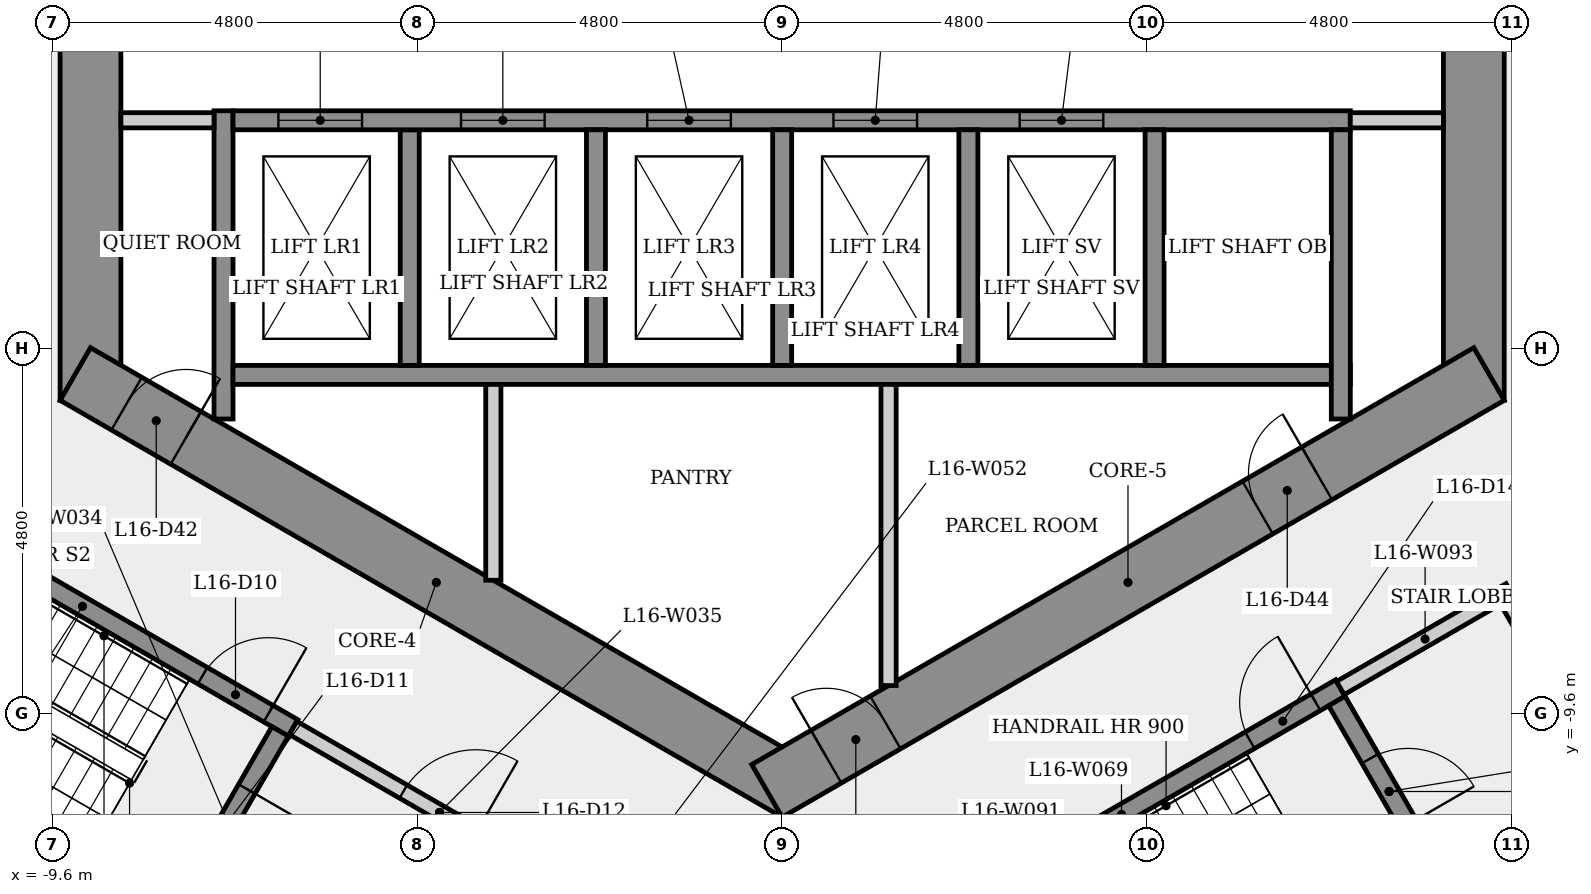
"""IFC4 building model, lengths in metres.
Left out: names, types, materials, properties, quantities, classifications, styles, units other than length and angle.
Written with IfcOpenShell. Run it as: python <this file> out.ifc"""

import sys

from ifc_helpers import new_model, si_unit, direction, frame, frame_2d, origin, place, context, subcontext, project, spatial, rectangle, extrude, element, fill, save


model = new_model("IFC4")
c1 = context("Model", 3, precision=1e-05, world=origin(), true_north=direction((0.0, 1.0)))
c2 = subcontext(c1, "Body", "Model", "MODEL_VIEW")
j1 = project(units=[si_unit("LENGTHUNIT", "METRE"), si_unit("PLANEANGLEUNIT", "RADIAN")], contexts=[c1])
p1 = place(None, origin())
s1 = spatial("IfcSite", under=j1, at=p1, CompositionType="ELEMENT")
p2 = place(p1, origin())
s2 = spatial("IfcBuilding", under=s1, at=p2, CompositionType="ELEMENT")
p3 = place(p2, frame((0.0, 0.0, 62.9)))
s3 = spatial("IfcBuildingStorey", under=s2, at=p3, CompositionType="ELEMENT", Elevation=62.9)
p4 = place(p3, frame((9.1, -5.485, 0.0), z_axis=(0.0, 0.0, 1.0), x_axis=(0.0, 1.0, 0.0)))
e1 = element("IfcWall", 1, at=p4, inside=s3, PredefinedType="SHEAR", context=c2, shape_type="SweptSolid", body=[
    extrude(rectangle(XDim=10.97, YDim=0.8, at=frame_2d((5.485, 0.0))), origin(), (0.0, 0.0, 1.0), 3.4),
])
p5 = place(p4, frame((4.685, 0.0, 0.0)))
e2 = element("IfcOpeningElement", 2, at=p5, cuts=e1, PredefinedType="OPENING", context=c2, shape_type="SweptSolid", body=[
    extrude(rectangle(XDim=1.6, YDim=2.1, at=frame_2d((0.8, 1.05))), frame((0.0, 0.41, 0.0), z_axis=(0.0, -1.0, 0.0), x_axis=(1.0, 0.0, 0.0)), (0.0, 0.0, 1.0), 0.82),
])
p6 = place(p3, frame((-9.1, 5.485, 0.0), z_axis=(0.0, 0.0, 1.0), x_axis=(0.0, -1.0, 0.0)))
e3 = element("IfcWall", 3, at=p6, inside=s3, PredefinedType="SHEAR", context=c2, shape_type="SweptSolid", body=[
    extrude(rectangle(XDim=10.97, YDim=0.8, at=frame_2d((5.485, 0.0))), origin(), (0.0, 0.0, 1.0), 3.4),
])
p7 = place(p6, frame((4.685, 0.0, 0.0)))
e4 = element("IfcOpeningElement", 4, at=p7, cuts=e3, PredefinedType="OPENING", context=c2, shape_type="SweptSolid", body=[
    extrude(rectangle(XDim=1.6, YDim=2.1, at=frame_2d((0.8, 1.05))), frame((0.0, 0.41, 0.0), z_axis=(0.0, -1.0, 0.0), x_axis=(1.0, 0.0, 0.0)), (0.0, 0.0, 1.0), 0.82),
])
p8 = place(p3, frame((-9.3, -5.138, 0.0), z_axis=(0.0, 0.0, 1.0), x_axis=(0.866023993627, -0.500002442456, 0.0)))
e5 = element("IfcWall", 5, at=p8, inside=s3, PredefinedType="SHEAR", context=c2, shape_type="SweptSolid", body=[
    extrude(rectangle(XDim=10.97, YDim=0.8, at=frame_2d((5.485, 0.0))), origin(), (0.0, 0.0, 1.0), 3.4),
])
p9 = place(p8, frame((0.78, 0.0, 0.0)))
e6 = element("IfcOpeningElement", 6, at=p9, cuts=e5, PredefinedType="OPENING", context=c2, shape_type="SweptSolid", body=[
    extrude(rectangle(XDim=0.9, YDim=2.1, at=frame_2d((0.45, 1.05))), frame((0.0, 0.41, 0.0), z_axis=(0.0, -1.0, 0.0), x_axis=(1.0, 0.0, 0.0)), (0.0, 0.0, 1.0), 0.82),
])
p10 = place(p3, frame((-0.2, -10.623, 0.0), z_axis=(0.0, 0.0, 1.0), x_axis=(0.866023993627, 0.500002442456, 0.0)))
e7 = element("IfcWall", 7, at=p10, inside=s3, PredefinedType="SHEAR", context=c2, shape_type="SweptSolid", body=[
    extrude(rectangle(XDim=10.97, YDim=0.8, at=frame_2d((5.485, 0.0))), origin(), (0.0, 0.0, 1.0), 3.4),
])
p11 = place(p10, frame((0.9, 0.0, 0.0)))
e8 = element("IfcOpeningElement", 8, at=p11, cuts=e7, PredefinedType="OPENING", context=c2, shape_type="SweptSolid", body=[
    extrude(rectangle(XDim=0.9, YDim=2.1, at=frame_2d((0.45, 1.05))), frame((0.0, 0.41, 0.0), z_axis=(0.0, -1.0, 0.0), x_axis=(1.0, 0.0, 0.0)), (0.0, 0.0, 1.0), 0.82),
])
p12 = place(p10, frame((7.455, 0.0, 0.0)))
e9 = element("IfcOpeningElement", 9, at=p12, cuts=e7, PredefinedType="OPENING", context=c2, shape_type="SweptSolid", body=[
    extrude(rectangle(XDim=0.9, YDim=2.1, at=frame_2d((0.45, 1.05))), frame((0.0, 0.41, 0.0), z_axis=(0.0, -1.0, 0.0), x_axis=(1.0, 0.0, 0.0)), (0.0, 0.0, 1.0), 0.82),
])
p13 = place(p3, frame((-11.977, -6.595, 0.0), z_axis=(0.0, 0.0, 1.0), x_axis=(0.866025499775, -0.499999833739, 0.0)))
e10 = element("IfcWall", 10, at=p13, inside=s3, PredefinedType="SHEAR", context=c2, shape_type="SweptSolid", body=[
    extrude(rectangle(XDim=6.4, YDim=0.25, at=frame_2d((3.2, 0.0))), origin(), (0.0, 0.0, 1.0), 3.0),
])
p14 = place(p13, frame((5.025, 0.0, 0.0)))
e11 = element("IfcOpeningElement", 11, at=p14, cuts=e10, PredefinedType="OPENING", context=c2, shape_type="SweptSolid", body=[
    extrude(rectangle(XDim=1.0, YDim=2.1, at=frame_2d((0.5, 1.05))), frame((0.0, 0.135, 0.0), z_axis=(0.0, -1.0, 0.0), x_axis=(1.0, 0.0, 0.0)), (0.0, 0.0, 1.0), 0.27),
])
p15 = place(p3, frame((-7.935, -12.393, 0.0), z_axis=(0.0, 0.0, 1.0), x_axis=(-0.866025499775, 0.499999833739, 0.0)))
e12 = element("IfcWall", 12, at=p15, inside=s3, PredefinedType="SHEAR", context=c2, shape_type="SweptSolid", body=[
    extrude(rectangle(XDim=6.4, YDim=0.25, at=frame_2d((3.2, 0.0))), origin(), (0.0, 0.0, 1.0), 3.0),
])
p16 = place(p3, frame((-7.35, -5.73, 0.0), z_axis=(0.0, 0.0, 1.0), x_axis=(0.0, 1.0, 0.0)))
e13 = element("IfcWall", 13, at=p16, inside=s3, PredefinedType="SHEAR", context=c2, shape_type="SweptSolid", body=[
    extrude(rectangle(XDim=4.055, YDim=0.25, at=frame_2d((2.028, 0.0))), origin(), (0.0, 0.0, 1.0), 3.0),
])
p17 = place(p3, frame((-7.475, -1.8, 0.0), z_axis=(0.0, 0.0, 1.0), x_axis=(-1.0, 0.0, 0.0)))
e14 = element("IfcWall", 14, at=p17, inside=s3, PredefinedType="PARTITIONING", context=c2, shape_type="SweptSolid", body=[
    extrude(rectangle(XDim=1.225, YDim=0.2, at=frame_2d((0.613, 0.0))), origin(), (0.0, 0.0, 1.0), 3.0),
])
p18 = place(p3, frame((-6.605, -9.841, 0.0), z_axis=(0.0, 0.0, 1.0), x_axis=(-0.499996545922, -0.866027397988, 0.0)))
e15 = element("IfcWall", 15, at=p18, inside=s3, PredefinedType="SHEAR", context=c2, shape_type="SweptSolid", body=[
    extrude(rectangle(XDim=2.75, YDim=0.25, at=frame_2d((1.375, 0.0))), origin(), (0.0, 0.0, 1.0), 3.0),
])
p19 = place(p18, frame((0.875, 0.0, 0.0)))
e16 = element("IfcOpeningElement", 16, at=p19, cuts=e15, PredefinedType="OPENING", context=c2, shape_type="SweptSolid", body=[
    extrude(rectangle(XDim=1.0, YDim=2.1, at=frame_2d((0.5, 1.05))), frame((0.0, 0.135, 0.0), z_axis=(0.0, -1.0, 0.0), x_axis=(1.0, 0.0, 0.0)), (0.0, 0.0, 1.0), 0.27),
])
p20 = place(p3, frame((-6.435, -9.795, 0.0), z_axis=(0.0, 0.0, 1.0), x_axis=(0.866012907634, -0.500021643343, 0.0)))
e17 = element("IfcWall", 17, at=p20, inside=s3, PredefinedType="PARTITIONING", context=c2, shape_type="SweptSolid", body=[
    extrude(rectangle(XDim=4.45, YDim=0.2, at=frame_2d((2.225, 0.0))), origin(), (0.0, 0.0, 1.0), 3.0),
])
p21 = place(p20, frame((1.675, 0.0, 0.0)))
e18 = element("IfcOpeningElement", 18, at=p21, cuts=e17, PredefinedType="OPENING", context=c2, shape_type="SweptSolid", body=[
    extrude(rectangle(XDim=1.1, YDim=2.1, at=frame_2d((0.55, 1.05))), frame((0.0, 0.11, 0.0), z_axis=(0.0, -1.0, 0.0), x_axis=(1.0, 0.0, 0.0)), (0.0, 0.0, 1.0), 0.22),
])
p22 = place(p3, frame((-7.225, -5.15, 0.0), z_axis=(0.0, 0.0, 1.0), x_axis=(1.0, 0.0, 0.0)))
e19 = element("IfcWall", 19, at=p22, inside=s3, PredefinedType="SHEAR", context=c2, shape_type="SweptSolid", body=[
    extrude(rectangle(XDim=14.7, YDim=0.25, at=frame_2d((7.35, 0.0))), origin(), (0.0, 0.0, 1.0), 3.0),
])
p23 = place(p3, frame((-4.9, -1.925, 0.0), z_axis=(0.0, 0.0, 1.0), x_axis=(0.0, -1.0, 0.0)))
e20 = element("IfcWall", 20, at=p23, inside=s3, PredefinedType="SHEAR", context=c2, shape_type="SweptSolid", body=[
    extrude(rectangle(XDim=3.1, YDim=0.25, at=frame_2d((1.55, 0.0))), origin(), (0.0, 0.0, 1.0), 3.4),
])
p24 = place(p3, frame((-7.225, -1.8, 0.0), z_axis=(0.0, 0.0, 1.0), x_axis=(1.0, 0.0, 0.0)))
e21 = element("IfcWall", 21, at=p24, inside=s3, PredefinedType="SHEAR", context=c2, shape_type="SweptSolid", body=[
    extrude(rectangle(XDim=14.7, YDim=0.25, at=frame_2d((7.35, 0.0))), origin(), (0.0, 0.0, 1.0), 3.0),
])
p25 = place(p24, frame((0.597, 0.0, 0.0)))
e22 = element("IfcOpeningElement", 22, at=p25, cuts=e21, PredefinedType="OPENING", context=c2, shape_type="SweptSolid", body=[
    extrude(rectangle(XDim=1.1, YDim=2.1, at=frame_2d((0.55, 1.05))), frame((0.0, 0.135, 0.0), z_axis=(0.0, -1.0, 0.0), x_axis=(1.0, 0.0, 0.0)), (0.0, 0.0, 1.0), 0.27),
])
p26 = place(p24, frame((3.0, 0.0, 0.0)))
e23 = element("IfcOpeningElement", 23, at=p26, cuts=e21, PredefinedType="OPENING", context=c2, shape_type="SweptSolid", body=[
    extrude(rectangle(XDim=1.1, YDim=2.1, at=frame_2d((0.55, 1.05))), frame((0.0, 0.135, 0.0), z_axis=(0.0, -1.0, 0.0), x_axis=(1.0, 0.0, 0.0)), (0.0, 0.0, 1.0), 0.27),
])
p27 = place(p24, frame((5.45, 0.0, 0.0)))
e24 = element("IfcOpeningElement", 24, at=p27, cuts=e21, PredefinedType="OPENING", context=c2, shape_type="SweptSolid", body=[
    extrude(rectangle(XDim=1.1, YDim=2.1, at=frame_2d((0.55, 1.05))), frame((0.0, 0.135, 0.0), z_axis=(0.0, -1.0, 0.0), x_axis=(1.0, 0.0, 0.0)), (0.0, 0.0, 1.0), 0.27),
])
p28 = place(p24, frame((7.9, 0.0, 0.0)))
e25 = element("IfcOpeningElement", 25, at=p28, cuts=e21, PredefinedType="OPENING", context=c2, shape_type="SweptSolid", body=[
    extrude(rectangle(XDim=1.1, YDim=2.1, at=frame_2d((0.55, 1.05))), frame((0.0, 0.135, 0.0), z_axis=(0.0, -1.0, 0.0), x_axis=(1.0, 0.0, 0.0)), (0.0, 0.0, 1.0), 0.27),
])
p29 = place(p24, frame((10.35, 0.0, 0.0)))
e26 = element("IfcOpeningElement", 26, at=p29, cuts=e21, PredefinedType="OPENING", context=c2, shape_type="SweptSolid", body=[
    extrude(rectangle(XDim=1.1, YDim=2.1, at=frame_2d((0.55, 1.05))), frame((0.0, 0.135, 0.0), z_axis=(0.0, -1.0, 0.0), x_axis=(1.0, 0.0, 0.0)), (0.0, 0.0, 1.0), 0.27),
])
p30 = place(p3, frame((-3.8, -5.275, 0.0), z_axis=(0.0, 0.0, 1.0), x_axis=(0.0, -1.0, 0.0)))
e27 = element("IfcWall", 27, at=p30, inside=s3, PredefinedType="PARTITIONING", context=c2, shape_type="SweptSolid", body=[
    extrude(rectangle(XDim=2.577, YDim=0.2, at=frame_2d((1.289, 0.0))), origin(), (0.0, 0.0, 1.0), 3.0),
])
for number, where, z_axis, x_axis in (
    (28, (-2.45, -1.925, 0.0), (0.0, 0.0, 1.0), (0.0, -1.0, 0.0)),
    (29, (0.0, -1.925, 0.0), (0.0, 0.0, 1.0), (0.0, -1.0, 0.0)),
):
    element("IfcWall", number, at=place(p3, frame(where, z_axis=z_axis, x_axis=x_axis)), inside=s3, PredefinedType="SHEAR", context=c2, shape_type="SweptSolid", body=[
        extrude(rectangle(XDim=3.1, YDim=0.25, at=frame_2d((1.55, 0.0))), origin(), (0.0, 0.0, 1.0), 3.4),
    ])
p31 = place(p3, frame((1.4, -5.275, 0.0), z_axis=(0.0, 0.0, 1.0), x_axis=(0.0, -1.0, 0.0)))
e30 = element("IfcWall", 30, at=p31, inside=s3, PredefinedType="PARTITIONING", context=c2, shape_type="SweptSolid", body=[
    extrude(rectangle(XDim=3.963, YDim=0.2, at=frame_2d((1.981, 0.0))), origin(), (0.0, 0.0, 1.0), 3.0),
])
p32 = place(p3, frame((1.585, -12.595, 0.0), z_axis=(0.0, 0.0, 1.0), x_axis=(0.866036417653, 0.499980922934, 0.0)))
e31 = element("IfcWall", 31, at=p32, inside=s3, PredefinedType="SHEAR", context=c2, shape_type="SweptSolid", body=[
    extrude(rectangle(XDim=6.65, YDim=0.25, at=frame_2d((3.325, 0.0))), origin(), (0.0, 0.0, 1.0), 3.0),
])
p33 = place(p32, frame((5.275, 0.0, 0.0)))
e32 = element("IfcOpeningElement", 32, at=p33, cuts=e31, PredefinedType="OPENING", context=c2, shape_type="SweptSolid", body=[
    extrude(rectangle(XDim=1.0, YDim=2.1, at=frame_2d((0.5, 1.05))), frame((0.0, 0.135, 0.0), z_axis=(0.0, -1.0, 0.0), x_axis=(1.0, 0.0, 0.0)), (0.0, 0.0, 1.0), 0.27),
])
for number, where, z_axis, x_axis in (
    (33, (2.45, -1.925, 0.0), (0.0, 0.0, 1.0), (0.0, -1.0, 0.0)),
    (34, (4.9, -1.925, 0.0), (0.0, 0.0, 1.0), (0.0, -1.0, 0.0)),
):
    element("IfcWall", number, at=place(p3, frame(where, z_axis=z_axis, x_axis=x_axis)), inside=s3, PredefinedType="SHEAR", context=c2, shape_type="SweptSolid", body=[
        extrude(rectangle(XDim=3.1, YDim=0.25, at=frame_2d((1.55, 0.0))), origin(), (0.0, 0.0, 1.0), 3.4),
    ])
p34 = place(p3, frame((7.298, -9.441, 0.0), z_axis=(0.0, 0.0, 1.0), x_axis=(0.500034990121, -0.866005201286, 0.0)))
e35 = element("IfcWall", 35, at=p34, inside=s3, PredefinedType="SHEAR", context=c2, shape_type="SweptSolid", body=[
    extrude(rectangle(XDim=2.75, YDim=0.25, at=frame_2d((1.375, 0.0))), origin(), (0.0, 0.0, 1.0), 3.0),
])
p35 = place(p34, frame((0.875, 0.0, 0.0)))
e36 = element("IfcOpeningElement", 36, at=p35, cuts=e35, PredefinedType="OPENING", context=c2, shape_type="SweptSolid", body=[
    extrude(rectangle(XDim=1.0, YDim=2.1, at=frame_2d((0.5, 1.05))), frame((0.0, 0.135, 0.0), z_axis=(0.0, -1.0, 0.0), x_axis=(1.0, 0.0, 0.0)), (0.0, 0.0, 1.0), 0.27),
])
p36 = place(p3, frame((7.344, -9.27, 0.0), z_axis=(0.0, 0.0, 1.0), x_axis=(0.866005588531, 0.500034319456, 0.0)))
e37 = element("IfcWall", 37, at=p36, inside=s3, PredefinedType="PARTITIONING", context=c2, shape_type="SweptSolid", body=[
    extrude(rectangle(XDim=2.575, YDim=0.2, at=frame_2d((1.288, 0.0))), origin(), (0.0, 0.0, 1.0), 3.0),
])
p37 = place(p3, frame((7.35, -1.925, 0.0), z_axis=(0.0, 0.0, 1.0), x_axis=(0.0, -1.0, 0.0)))
e38 = element("IfcWall", 38, at=p37, inside=s3, PredefinedType="SHEAR", context=c2, shape_type="SweptSolid", body=[
    extrude(rectangle(XDim=3.805, YDim=0.25, at=frame_2d((1.903, 0.0))), origin(), (0.0, 0.0, 1.0), 3.0),
])
p38 = place(p3, frame((8.7, -1.8, 0.0), z_axis=(0.0, 0.0, 1.0), x_axis=(-1.0, 0.0, 0.0)))
e39 = element("IfcWall", 39, at=p38, inside=s3, PredefinedType="PARTITIONING", context=c2, shape_type="SweptSolid", body=[
    extrude(rectangle(XDim=1.225, YDim=0.2, at=frame_2d((0.613, 0.0))), origin(), (0.0, 0.0, 1.0), 3.0),
])
p39 = place(p3, frame((9.537, -8.119, 0.0), z_axis=(0.0, 0.0, 1.0), x_axis=(0.499990139034, -0.866031096941, 0.0)))
e40 = element("IfcWall", 40, at=p39, inside=s3, PredefinedType="PARTITIONING", context=c2, shape_type="SweptSolid", body=[
    extrude(rectangle(XDim=3.0, YDim=0.2, at=frame_2d((1.5, 0.0))), origin(), (0.0, 0.0, 1.0), 3.0),
])
p40 = place(p39, frame((0.935, 0.0, 0.0)))
e41 = element("IfcOpeningElement", 41, at=p40, cuts=e40, PredefinedType="OPENING", context=c2, shape_type="SweptSolid", body=[
    extrude(rectangle(XDim=1.0, YDim=2.1, at=frame_2d((0.5, 1.05))), frame((0.0, 0.11, 0.0), z_axis=(0.0, -1.0, 0.0), x_axis=(1.0, 0.0, 0.0)), (0.0, 0.0, 1.0), 0.22),
])
p41 = place(p3, frame((10.901, -10.681, 0.0), z_axis=(0.0, 0.0, 1.0), x_axis=(-0.866009402589, -0.500027713859, 0.0)))
e42 = element("IfcWall", 42, at=p41, inside=s3, PredefinedType="PARTITIONING", context=c2, shape_type="SweptSolid", body=[
    extrude(rectangle(XDim=2.1, YDim=0.2, at=frame_2d((1.05, 0.0))), origin(), (0.0, 0.0, 1.0), 3.0),
])
p42 = place(p25, origin())
e43 = element("IfcDoor", 43, at=p42, inside=s3, OperationType="SLIDING_TO_LEFT", PredefinedType="DOOR", context=c2, shape_type="SweptSolid", body=[
    extrude(rectangle(XDim=1.1, YDim=2.1, at=frame_2d((0.55, 1.05))), frame((0.0, 0.025, 0.0), z_axis=(0.0, -1.0, 0.0), x_axis=(1.0, 0.0, 0.0)), (0.0, 0.0, 1.0), 0.05),
])
fill(e22, e43)
p43 = place(p26, origin())
e44 = element("IfcDoor", 44, at=p43, inside=s3, OperationType="SLIDING_TO_LEFT", PredefinedType="DOOR", context=c2, shape_type="SweptSolid", body=[
    extrude(rectangle(XDim=1.1, YDim=2.1, at=frame_2d((0.55, 1.05))), frame((0.0, 0.025, 0.0), z_axis=(0.0, -1.0, 0.0), x_axis=(1.0, 0.0, 0.0)), (0.0, 0.0, 1.0), 0.05),
])
fill(e23, e44)
p44 = place(p27, origin())
e45 = element("IfcDoor", 45, at=p44, inside=s3, OperationType="SLIDING_TO_LEFT", PredefinedType="DOOR", context=c2, shape_type="SweptSolid", body=[
    extrude(rectangle(XDim=1.1, YDim=2.1, at=frame_2d((0.55, 1.05))), frame((0.0, 0.025, 0.0), z_axis=(0.0, -1.0, 0.0), x_axis=(1.0, 0.0, 0.0)), (0.0, 0.0, 1.0), 0.05),
])
fill(e24, e45)
p45 = place(p28, origin())
e46 = element("IfcDoor", 46, at=p45, inside=s3, OperationType="SLIDING_TO_LEFT", PredefinedType="DOOR", context=c2, shape_type="SweptSolid", body=[
    extrude(rectangle(XDim=1.1, YDim=2.1, at=frame_2d((0.55, 1.05))), frame((0.0, 0.025, 0.0), z_axis=(0.0, -1.0, 0.0), x_axis=(1.0, 0.0, 0.0)), (0.0, 0.0, 1.0), 0.05),
])
fill(e25, e46)
p46 = place(p29, origin())
e47 = element("IfcDoor", 47, at=p46, inside=s3, OperationType="SLIDING_TO_LEFT", PredefinedType="DOOR", context=c2, shape_type="SweptSolid", body=[
    extrude(rectangle(XDim=1.1, YDim=2.1, at=frame_2d((0.55, 1.05))), frame((0.0, 0.025, 0.0), z_axis=(0.0, -1.0, 0.0), x_axis=(1.0, 0.0, 0.0)), (0.0, 0.0, 1.0), 0.05),
])
fill(e26, e47)
p47 = place(p14, origin())
e48 = element("IfcDoor", 48, at=p47, inside=s3, OperationType="SINGLE_SWING_RIGHT", PredefinedType="DOOR", context=c2, shape_type="SweptSolid", body=[
    extrude(rectangle(XDim=1.0, YDim=2.1, at=frame_2d((0.5, 1.05))), frame((0.0, 0.025, 0.0), z_axis=(0.0, -1.0, 0.0), x_axis=(1.0, 0.0, 0.0)), (0.0, 0.0, 1.0), 0.05),
])
fill(e11, e48)
p48 = place(p19, origin())
e49 = element("IfcDoor", 49, at=p48, inside=s3, OperationType="SINGLE_SWING_LEFT", PredefinedType="DOOR", context=c2, shape_type="SweptSolid", body=[
    extrude(rectangle(XDim=1.0, YDim=2.1, at=frame_2d((0.5, 1.05))), frame((0.0, 0.025, 0.0), z_axis=(0.0, -1.0, 0.0), x_axis=(1.0, 0.0, 0.0)), (0.0, 0.0, 1.0), 0.05),
])
fill(e16, e49)
p49 = place(p21, origin())
e50 = element("IfcDoor", 50, at=p49, inside=s3, OperationType="SINGLE_SWING_RIGHT", PredefinedType="DOOR", context=c2, shape_type="SweptSolid", body=[
    extrude(rectangle(XDim=1.1, YDim=2.1, at=frame_2d((0.55, 1.05))), frame((0.0, 0.025, 0.0), z_axis=(0.0, -1.0, 0.0), x_axis=(1.0, 0.0, 0.0)), (0.0, 0.0, 1.0), 0.05),
])
fill(e18, e50)
p50 = place(p33, origin())
e51 = element("IfcDoor", 51, at=p50, inside=s3, OperationType="SINGLE_SWING_RIGHT", PredefinedType="DOOR", context=c2, shape_type="SweptSolid", body=[
    extrude(rectangle(XDim=1.0, YDim=2.1, at=frame_2d((0.5, 1.05))), frame((0.0, 0.025, 0.0), z_axis=(0.0, -1.0, 0.0), x_axis=(1.0, 0.0, 0.0)), (0.0, 0.0, 1.0), 0.05),
])
fill(e32, e51)
p51 = place(p35, origin())
e52 = element("IfcDoor", 52, at=p51, inside=s3, OperationType="SINGLE_SWING_RIGHT", PredefinedType="DOOR", context=c2, shape_type="SweptSolid", body=[
    extrude(rectangle(XDim=1.0, YDim=2.1, at=frame_2d((0.5, 1.05))), frame((0.0, 0.025, 0.0), z_axis=(0.0, -1.0, 0.0), x_axis=(1.0, 0.0, 0.0)), (0.0, 0.0, 1.0), 0.05),
])
fill(e36, e52)
p52 = place(p9, origin())
e53 = element("IfcDoor", 53, at=p52, inside=s3, OperationType="SINGLE_SWING_RIGHT", PredefinedType="DOOR", context=c2, shape_type="SweptSolid", body=[
    extrude(rectangle(XDim=0.9, YDim=2.1, at=frame_2d((0.45, 1.05))), frame((0.0, 0.025, 0.0), z_axis=(0.0, -1.0, 0.0), x_axis=(1.0, 0.0, 0.0)), (0.0, 0.0, 1.0), 0.05),
])
fill(e6, e53)
p53 = place(p11, origin())
e54 = element("IfcDoor", 54, at=p53, inside=s3, OperationType="SINGLE_SWING_LEFT", PredefinedType="DOOR", context=c2, shape_type="SweptSolid", body=[
    extrude(rectangle(XDim=0.9, YDim=2.1, at=frame_2d((0.45, 1.05))), frame((0.0, 0.025, 0.0), z_axis=(0.0, -1.0, 0.0), x_axis=(1.0, 0.0, 0.0)), (0.0, 0.0, 1.0), 0.05),
])
fill(e8, e54)
p54 = place(p12, origin())
e55 = element("IfcDoor", 55, at=p54, inside=s3, OperationType="SINGLE_SWING_RIGHT", PredefinedType="DOOR", context=c2, shape_type="SweptSolid", body=[
    extrude(rectangle(XDim=0.9, YDim=2.1, at=frame_2d((0.45, 1.05))), frame((0.0, 0.025, 0.0), z_axis=(0.0, -1.0, 0.0), x_axis=(1.0, 0.0, 0.0)), (0.0, 0.0, 1.0), 0.05),
])
fill(e9, e55)
save(model, sys.argv[1])
